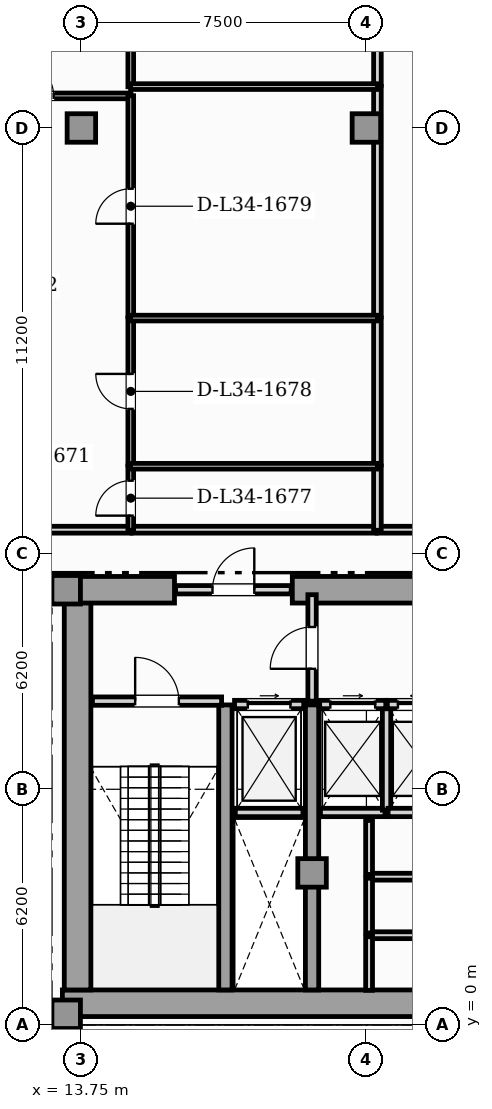
"""IFC4 building model, lengths in metres.
Left out: names, types, materials, properties, quantities, classifications, styles, units other than length and angle.
Written with IfcOpenShell. Run it as: python <this file> out.ifc"""

import sys

from ifc_helpers import new_model, si_unit, direction, frame, frame_2d, origin, origin_2d, place, context, subcontext, project, spatial, rectangle, extrude, element, fill, save


model = new_model("IFC4")
c1 = context("Model", 3, precision=1e-05, world=origin(), true_north=direction((0.0, 1.0)))
c2 = subcontext(c1, "Body", "Model", "MODEL_VIEW")
j1 = project(units=[si_unit("LENGTHUNIT", "METRE"), si_unit("PLANEANGLEUNIT", "RADIAN")], contexts=[c1])
p1 = place(None, origin())
s1 = spatial("IfcSite", under=j1, at=p1, CompositionType="ELEMENT")
p2 = place(p1, origin())
s2 = spatial("IfcBuilding", under=s1, at=p2, CompositionType="ELEMENT")
p3 = place(p2, frame((0.0, 0.0, 140.15)))
s3 = spatial("IfcBuildingStorey", under=s2, at=p3, CompositionType="ELEMENT", Elevation=140.15)
p4 = place(p3, frame((13.25, 0.57, 0.0), z_axis=(0.0, 0.0, 1.0), x_axis=(1.0, 0.0, 0.0)))
e1 = element("IfcWall", 1, at=p4, inside=s3, PredefinedType="SHEAR", context=c2, shape_type="SweptSolid", body=[
    extrude(rectangle(XDim=31.0, YDim=0.7, at=frame_2d((15.5, 0.0))), origin(), (0.0, 0.0, 1.0), 4.83),
])
p5 = place(p3, frame((13.65, 0.92, 0.0), z_axis=(0.0, 0.0, 1.0), x_axis=(0.0, 1.0, 0.0)))
e2 = element("IfcWall", 2, at=p5, inside=s3, PredefinedType="SHEAR", context=c2, shape_type="SweptSolid", body=[
    extrude(rectangle(XDim=10.53, YDim=0.7, at=frame_2d((5.265, 0.0))), origin(), (0.0, 0.0, 1.0), 4.83),
])
p6 = place(p3, frame((13.25, 11.45, 0.0), z_axis=(0.0, 0.0, 1.0), x_axis=(1.0, 0.0, 0.0)))
e3 = element("IfcWall", 3, at=p6, inside=s3, PredefinedType="SHEAR", context=c2, shape_type="SweptSolid", body=[
    extrude(rectangle(XDim=2.95, YDim=0.7, at=frame_2d((1.475, 0.0))), origin(), (0.0, 0.0, 1.0), 4.83),
])
p7 = place(p3, frame((19.3, 11.45, 0.0), z_axis=(0.0, 0.0, 1.0), x_axis=(1.0, 0.0, 0.0)))
e4 = element("IfcWall", 4, at=p7, inside=s3, PredefinedType="SHEAR", context=c2, shape_type="SweptSolid", body=[
    extrude(rectangle(XDim=7.3, YDim=0.7, at=frame_2d((3.65, 0.0))), origin(), (0.0, 0.0, 1.0), 4.83),
])
for number, where, z_axis, x_axis in (
    (5, (17.54, 0.92, 0.0), (0.0, 0.0, 1.0), (0.0, 1.0, 0.0)),
    (6, (19.82, 0.92, 0.0), (0.0, 0.0, 1.0), (0.0, 1.0, 0.0)),
):
    element("IfcWall", number, at=place(p3, frame(where, z_axis=z_axis, x_axis=x_axis)), inside=s3, PredefinedType="SHEAR", context=c2, shape_type="SweptSolid", body=[
        extrude(rectangle(XDim=7.5, YDim=0.35, at=frame_2d((3.75, 0.0))), origin(), (0.0, 0.0, 1.0), 4.83),
    ])
for number, where, z_axis, x_axis in (
    (7, (13.35, 0.28, 0.0), (0.0, 0.0, 1.0), (1.0, 0.0, 0.0)),
    (8, (13.35, 11.45, 0.0), (0.0, 0.0, 1.0), (1.0, 0.0, 0.0)),
    (9, (19.82, 4.0, 0.0), (0.0, 0.0, 1.0), (1.0, 0.0, 0.0)),
    (10, (13.75, 23.6, 0.0), (0.0, 0.0, 1.0), (1.0, 0.0, 0.0)),
    (11, (21.25, 23.6, 0.0), (0.0, 0.0, 1.0), (1.0, 0.0, 0.0)),
):
    element("IfcColumn", number, at=place(p3, frame(where, z_axis=z_axis, x_axis=x_axis)), inside=s3, PredefinedType="COLUMN", context=c2, shape_type="SweptSolid", body=[
        extrude(rectangle(XDim=0.75, YDim=0.75, at=origin_2d()), origin(), (0.0, 0.0, 1.0), 5.05),
    ])
p8 = place(p3, frame((5.84, 0.18, 0.0), z_axis=(0.0, 0.0, 1.0), x_axis=(1.0, 0.0, 0.0)))
e12 = element("IfcWall", 12, at=p8, inside=s3, PredefinedType="SOLIDWALL", context=c2, shape_type="SweptSolid", body=[
    extrude(rectangle(XDim=7.41, YDim=0.3, at=frame_2d((3.705, 0.0))), origin(), (0.0, 0.0, 1.0), 4.83),
])
p9 = place(p8, frame((2.505, 0.0, 0.85)))
e13 = element("IfcOpeningElement", 13, at=p9, cuts=e12, PredefinedType="OPENING", context=c2, shape_type="SweptSolid", body=[
    extrude(rectangle(XDim=2.4, YDim=2.0, at=frame_2d((1.2, 1.0))), frame((0.0, 0.16, 0.0), z_axis=(0.0, -1.0, 0.0), x_axis=(1.0, 0.0, 0.0)), (0.0, 0.0, 1.0), 0.32),
])
p10 = place(p3, frame((17.8, 5.59, 0.0), z_axis=(0.0, 0.0, 1.0), x_axis=(1.0, 0.0, 0.0)))
e14 = element("IfcWall", 14, at=p10, inside=s3, PredefinedType="SOLIDWALL", context=c2, shape_type="SweptSolid", body=[
    extrude(rectangle(XDim=1.78, YDim=0.22, at=frame_2d((0.89, 0.0))), origin(), (0.0, 0.0, 1.0), 4.83),
])
p11 = place(p3, frame((17.78, 8.43, 0.0), z_axis=(0.0, 0.0, 1.0), x_axis=(1.0, 0.0, 0.0)))
e15 = element("IfcWall", 15, at=p11, inside=s3, PredefinedType="SOLIDWALL", context=c2, shape_type="SweptSolid", body=[
    extrude(rectangle(XDim=1.82, YDim=0.22, at=frame_2d((0.91, 0.0))), origin(), (0.0, 0.0, 1.0), 4.83),
])
p12 = place(p11, frame((0.35, 0.0, 0.0)))
e16 = element("IfcOpeningElement", 16, at=p12, cuts=e15, PredefinedType="OPENING", context=c2, shape_type="SweptSolid", body=[
    extrude(rectangle(XDim=1.12, YDim=2.25, at=frame_2d((0.56, 1.125))), frame((0.0, 0.12, 0.0), z_axis=(0.0, -1.0, 0.0), x_axis=(1.0, 0.0, 0.0)), (0.0, 0.0, 1.0), 0.24),
])
p13 = place(p3, frame((20.04, 5.59, 0.0), z_axis=(0.0, 0.0, 1.0), x_axis=(1.0, 0.0, 0.0)))
e17 = element("IfcWall", 17, at=p13, inside=s3, PredefinedType="SOLIDWALL", context=c2, shape_type="SweptSolid", body=[
    extrude(rectangle(XDim=1.7, YDim=0.22, at=frame_2d((0.85, 0.0))), origin(), (0.0, 0.0, 1.0), 4.83),
])
p14 = place(p3, frame((21.78, 5.65, 0.0), z_axis=(0.0, 0.0, 1.0), x_axis=(0.0, 1.0, 0.0)))
e18 = element("IfcWall", 18, at=p14, inside=s3, PredefinedType="SOLIDWALL", context=c2, shape_type="SweptSolid", body=[
    extrude(rectangle(XDim=2.7, YDim=0.22, at=frame_2d((1.35, 0.0))), origin(), (0.0, 0.0, 1.0), 4.83),
])
p15 = place(p3, frame((20.02, 8.43, 0.0), z_axis=(0.0, 0.0, 1.0), x_axis=(1.0, 0.0, 0.0)))
e19 = element("IfcWall", 19, at=p15, inside=s3, PredefinedType="SOLIDWALL", context=c2, shape_type="SweptSolid", body=[
    extrude(rectangle(XDim=1.74, YDim=0.22, at=frame_2d((0.87, 0.0))), origin(), (0.0, 0.0, 1.0), 4.83),
])
p16 = place(p15, frame((0.28, 0.0, 0.0)))
e20 = element("IfcOpeningElement", 20, at=p16, cuts=e19, PredefinedType="OPENING", context=c2, shape_type="SweptSolid", body=[
    extrude(rectangle(XDim=1.18, YDim=2.2, at=frame_2d((0.59, 1.1))), frame((0.0, 0.12, 0.0), z_axis=(0.0, -1.0, 0.0), x_axis=(1.0, 0.0, 0.0)), (0.0, 0.0, 1.0), 0.24),
])
p17 = place(p3, frame((21.82, 5.59, 0.0), z_axis=(0.0, 0.0, 1.0), x_axis=(1.0, 0.0, 0.0)))
e21 = element("IfcWall", 21, at=p17, inside=s3, PredefinedType="SOLIDWALL", context=c2, shape_type="SweptSolid", body=[
    extrude(rectangle(XDim=1.7, YDim=0.22, at=frame_2d((0.85, 0.0))), origin(), (0.0, 0.0, 1.0), 4.83),
])
p18 = place(p3, frame((21.8, 8.43, 0.0), z_axis=(0.0, 0.0, 1.0), x_axis=(1.0, 0.0, 0.0)))
e22 = element("IfcWall", 22, at=p18, inside=s3, PredefinedType="SOLIDWALL", context=c2, shape_type="SweptSolid", body=[
    extrude(rectangle(XDim=1.74, YDim=0.22, at=frame_2d((0.87, 0.0))), origin(), (0.0, 0.0, 1.0), 4.83),
])
p19 = place(p18, frame((0.28, 0.0, 0.0)))
e23 = element("IfcOpeningElement", 23, at=p19, cuts=e22, PredefinedType="OPENING", context=c2, shape_type="SweptSolid", body=[
    extrude(rectangle(XDim=1.18, YDim=2.2, at=frame_2d((0.59, 1.1))), frame((0.0, 0.12, 0.0), z_axis=(0.0, -1.0, 0.0), x_axis=(1.0, 0.0, 0.0)), (0.0, 0.0, 1.0), 0.24),
])
p20 = place(p3, frame((14.04, 8.52, 0.0), z_axis=(0.0, 0.0, 1.0), x_axis=(1.0, 0.0, 0.0)))
e24 = element("IfcWall", 24, at=p20, inside=s3, PredefinedType="SOLIDWALL", context=c2, shape_type="SweptSolid", body=[
    extrude(rectangle(XDim=3.4, YDim=0.22, at=frame_2d((1.7, 0.0))), origin(), (0.0, 0.0, 1.0), 4.83),
])
p21 = place(p20, frame((1.125, 0.0, 0.0)))
e25 = element("IfcOpeningElement", 25, at=p21, cuts=e24, PredefinedType="OPENING", context=c2, shape_type="SweptSolid", body=[
    extrude(rectangle(XDim=1.15, YDim=2.2, at=frame_2d((0.575, 1.1))), frame((0.0, 0.12, 0.0), z_axis=(0.0, -1.0, 0.0), x_axis=(1.0, 0.0, 0.0)), (0.0, 0.0, 1.0), 0.24),
])
p22 = place(p3, frame((19.82, 8.52, 0.0), z_axis=(0.0, 0.0, 1.0), x_axis=(0.0, 1.0, 0.0)))
e26 = element("IfcWall", 26, at=p22, inside=s3, PredefinedType="SOLIDWALL", context=c2, shape_type="SweptSolid", body=[
    extrude(rectangle(XDim=2.8, YDim=0.22, at=frame_2d((1.4, 0.0))), origin(), (0.0, 0.0, 1.0), 4.286),
])
p23 = place(p22, frame((0.85, 0.0, 0.0)))
e27 = element("IfcOpeningElement", 27, at=p23, cuts=e26, PredefinedType="OPENING", context=c2, shape_type="SweptSolid", body=[
    extrude(rectangle(XDim=1.1, YDim=2.2, at=frame_2d((0.55, 1.1))), frame((0.0, 0.12, 0.0), z_axis=(0.0, -1.0, 0.0), x_axis=(1.0, 0.0, 0.0)), (0.0, 0.0, 1.0), 0.24),
])
p24 = place(p3, frame((16.23, 11.45, 0.0), z_axis=(0.0, 0.0, 1.0), x_axis=(1.0, 0.0, 0.0)))
e28 = element("IfcWall", 28, at=p24, inside=s3, PredefinedType="SOLIDWALL", context=c2, shape_type="SweptSolid", body=[
    extrude(rectangle(XDim=3.04, YDim=0.22, at=frame_2d((1.52, 0.0))), origin(), (0.0, 0.0, 1.0), 4.83),
])
p25 = place(p24, frame((0.97, 0.0, 0.0)))
e29 = element("IfcOpeningElement", 29, at=p25, cuts=e28, PredefinedType="OPENING", context=c2, shape_type="SweptSolid", body=[
    extrude(rectangle(XDim=1.1, YDim=2.2, at=frame_2d((0.55, 1.1))), frame((0.0, 0.12, 0.0), z_axis=(0.0, -1.0, 0.0), x_axis=(1.0, 0.0, 0.0)), (0.0, 0.0, 1.0), 0.24),
])
p26 = place(p3, frame((21.36, 2.36, 0.0), z_axis=(0.0, 0.0, 1.0), x_axis=(1.0, 0.0, 0.0)))
e30 = element("IfcWall", 30, at=p26, inside=s3, PredefinedType="PARTITIONING", context=c2, shape_type="SweptSolid", body=[
    extrude(rectangle(XDim=3.94, YDim=0.18, at=frame_2d((1.97, 0.0))), origin(), (0.0, 0.0, 1.0), 4.83),
])
p27 = place(p3, frame((21.32, 0.91, 0.0), z_axis=(0.0, 0.0, 1.0), x_axis=(0.0, 1.0, 0.0)))
e31 = element("IfcWall", 31, at=p27, inside=s3, PredefinedType="PARTITIONING", context=c2, shape_type="SweptSolid", body=[
    extrude(rectangle(XDim=1.41, YDim=0.18, at=frame_2d((0.705, 0.0))), origin(), (0.0, 0.0, 1.0), 4.83),
])
p28 = place(p3, frame((21.36, 3.9, 0.0), z_axis=(0.0, 0.0, 1.0), x_axis=(1.0, 0.0, 0.0)))
e32 = element("IfcWall", 32, at=p28, inside=s3, PredefinedType="PARTITIONING", context=c2, shape_type="SweptSolid", body=[
    extrude(rectangle(XDim=3.94, YDim=0.18, at=frame_2d((1.97, 0.0))), origin(), (0.0, 0.0, 1.0), 4.83),
])
p29 = place(p3, frame((21.32, 2.42, 0.0), z_axis=(0.0, 0.0, 1.0), x_axis=(0.0, 1.0, 0.0)))
e33 = element("IfcWall", 33, at=p29, inside=s3, PredefinedType="PARTITIONING", context=c2, shape_type="SweptSolid", body=[
    extrude(rectangle(XDim=1.44, YDim=0.18, at=frame_2d((0.72, 0.0))), origin(), (0.0, 0.0, 1.0), 4.83),
])
p30 = place(p3, frame((21.32, 3.96, 0.0), z_axis=(0.0, 0.0, 1.0), x_axis=(0.0, 1.0, 0.0)))
e34 = element("IfcWall", 34, at=p30, inside=s3, PredefinedType="PARTITIONING", context=c2, shape_type="SweptSolid", body=[
    extrude(rectangle(XDim=1.42, YDim=0.18, at=frame_2d((0.71, 0.0))), origin(), (0.0, 0.0, 1.0), 4.83),
])
p31 = place(p3, frame((6.105, 11.585, 0.0), z_axis=(0.0, 0.0, 1.0), x_axis=(1.0, 0.0, 0.0)))
e35 = element("IfcWall", 35, at=p31, inside=s3, PredefinedType="PARTITIONING", context=c2, shape_type="SweptSolid", body=[
    extrude(rectangle(XDim=7.04, YDim=0.18, at=frame_2d((3.52, 0.0))), origin(), (0.0, 0.0, 1.0), 4.83),
])
p32 = place(p31, frame((3.02, 0.0, 0.0)))
e36 = element("IfcOpeningElement", 36, at=p32, cuts=e35, PredefinedType="OPENING", context=c2, shape_type="SweptSolid", body=[
    extrude(rectangle(XDim=1.0, YDim=2.15, at=frame_2d((0.5, 1.075))), frame((0.0, 0.1, 0.0), z_axis=(0.0, -1.0, 0.0), x_axis=(1.0, 0.0, 0.0)), (0.0, 0.0, 1.0), 0.2),
])
p33 = place(p3, frame((21.535, 13.03, 0.0), z_axis=(0.0, 0.0, 1.0), x_axis=(1.0, 0.0, 0.0)))
e37 = element("IfcWall", 37, at=p33, inside=s3, PredefinedType="PARTITIONING", context=c2, shape_type="SweptSolid", body=[
    extrude(rectangle(XDim=10.23, YDim=0.18, at=frame_2d((5.115, 0.0))), origin(), (0.0, 0.0, 1.0), 4.83),
])
p34 = place(p33, frame((3.081, 0.0, 0.0)))
e38 = element("IfcOpeningElement", 38, at=p34, cuts=e37, PredefinedType="OPENING", context=c2, shape_type="SweptSolid", body=[
    extrude(rectangle(XDim=1.0, YDim=2.15, at=frame_2d((0.5, 1.075))), frame((0.0, 0.1, 0.0), z_axis=(0.0, -1.0, 0.0), x_axis=(1.0, 0.0, 0.0)), (0.0, 0.0, 1.0), 0.2),
])
p35 = place(p3, frame((10.065, 13.03, 0.0), z_axis=(0.0, 0.0, 1.0), x_axis=(1.0, 0.0, 0.0)))
e39 = element("IfcWall", 39, at=p35, inside=s3, PredefinedType="PARTITIONING", context=c2, shape_type="SweptSolid", body=[
    extrude(rectangle(XDim=4.99, YDim=0.18, at=frame_2d((2.495, 0.0))), origin(), (0.0, 0.0, 1.0), 4.83),
])
p36 = place(p35, frame((1.247, 0.0, 0.0)))
e40 = element("IfcOpeningElement", 40, at=p36, cuts=e39, PredefinedType="OPENING", context=c2, shape_type="SweptSolid", body=[
    extrude(rectangle(XDim=1.0, YDim=2.15, at=frame_2d((0.5, 1.075))), frame((0.0, 0.1, 0.0), z_axis=(0.0, -1.0, 0.0), x_axis=(1.0, 0.0, 0.0)), (0.0, 0.0, 1.0), 0.2),
])
p37 = place(p3, frame((15.085, 13.03, 0.0), z_axis=(0.0, 0.0, 1.0), x_axis=(1.0, 0.0, 0.0)))
e41 = element("IfcWall", 41, at=p37, inside=s3, PredefinedType="PARTITIONING", context=c2, shape_type="SweptSolid", body=[
    extrude(rectangle(XDim=6.42, YDim=0.18, at=frame_2d((3.21, 0.0))), origin(), (0.0, 0.0, 1.0), 4.83),
])
p38 = place(p3, frame((21.54, 13.015, 0.0), z_axis=(0.0, 0.0, 1.0), x_axis=(0.0, 1.0, 0.0)))
e42 = element("IfcWall", 42, at=p38, inside=s3, PredefinedType="PARTITIONING", context=c2, shape_type="SweptSolid", body=[
    extrude(rectangle(XDim=1.69, YDim=0.2, at=frame_2d((0.845, 0.0))), origin(), (0.0, 0.0, 1.0), 4.83),
])
p39 = place(p3, frame((21.54, 14.735, 0.0), z_axis=(0.0, 0.0, 1.0), x_axis=(0.0, 1.0, 0.0)))
e43 = element("IfcWall", 43, at=p39, inside=s3, PredefinedType="PARTITIONING", context=c2, shape_type="SweptSolid", body=[
    extrude(rectangle(XDim=3.868, YDim=0.2, at=frame_2d((1.934, 0.0))), origin(), (0.0, 0.0, 1.0), 4.83),
])
p40 = place(p3, frame((21.54, 18.633, 0.0), z_axis=(0.0, 0.0, 1.0), x_axis=(0.0, 1.0, 0.0)))
e44 = element("IfcWall", 44, at=p40, inside=s3, PredefinedType="PARTITIONING", context=c2, shape_type="SweptSolid", body=[
    extrude(rectangle(XDim=6.061, YDim=0.2, at=frame_2d((3.03, 0.0))), origin(), (0.0, 0.0, 1.0), 4.83),
])
p41 = place(p3, frame((21.54, 24.724, 0.0), z_axis=(0.0, 0.0, 1.0), x_axis=(0.0, 1.0, 0.0)))
e45 = element("IfcWall", 45, at=p41, inside=s3, PredefinedType="PARTITIONING", context=c2, shape_type="SweptSolid", body=[
    extrude(rectangle(XDim=8.741, YDim=0.2, at=frame_2d((4.371, 0.0))), origin(), (0.0, 0.0, 1.0), 4.83),
])
p42 = place(p3, frame((10.065, 24.444, 0.0), z_axis=(0.0, 0.0, 1.0), x_axis=(1.0, 0.0, 0.0)))
e46 = element("IfcWall", 46, at=p42, inside=s3, PredefinedType="PARTITIONING", context=c2, shape_type="SweptSolid", body=[
    extrude(rectangle(XDim=4.99, YDim=0.15, at=frame_2d((2.495, 0.0))), origin(), (0.0, 0.0, 1.0), 4.83),
])
p43 = place(p42, frame((2.035, 0.0, 0.0)))
e47 = element("IfcOpeningElement", 47, at=p43, cuts=e46, PredefinedType="OPENING", context=c2, shape_type="SweptSolid", body=[
    extrude(rectangle(XDim=0.92, YDim=2.1, at=frame_2d((0.46, 1.05))), frame((0.0, 0.085, 0.0), z_axis=(0.0, -1.0, 0.0), x_axis=(1.0, 0.0, 0.0)), (0.0, 0.0, 1.0), 0.17),
])
p44 = place(p3, frame((15.05, 13.015, 0.0), z_axis=(0.0, 0.0, 1.0), x_axis=(0.0, 1.0, 0.0)))
e48 = element("IfcWall", 48, at=p44, inside=s3, PredefinedType="PARTITIONING", context=c2, shape_type="SweptSolid", body=[
    extrude(rectangle(XDim=1.69, YDim=0.15, at=frame_2d((0.845, 0.0))), origin(), (0.0, 0.0, 1.0), 4.83),
])
p45 = place(p44, frame((0.385, 0.0, 0.0)))
e49 = element("IfcOpeningElement", 49, at=p45, cuts=e48, PredefinedType="OPENING", context=c2, shape_type="SweptSolid", body=[
    extrude(rectangle(XDim=0.92, YDim=2.1, at=frame_2d((0.46, 1.05))), frame((0.0, 0.085, 0.0), z_axis=(0.0, -1.0, 0.0), x_axis=(1.0, 0.0, 0.0)), (0.0, 0.0, 1.0), 0.17),
])
p46 = place(p3, frame((15.05, 14.735, 0.0), z_axis=(0.0, 0.0, 1.0), x_axis=(0.0, 1.0, 0.0)))
e50 = element("IfcWall", 50, at=p46, inside=s3, PredefinedType="PARTITIONING", context=c2, shape_type="SweptSolid", body=[
    extrude(rectangle(XDim=3.868, YDim=0.15, at=frame_2d((1.934, 0.0))), origin(), (0.0, 0.0, 1.0), 4.83),
])
p47 = place(p46, frame((1.474, 0.0, 0.0)))
e51 = element("IfcOpeningElement", 51, at=p47, cuts=e50, PredefinedType="OPENING", context=c2, shape_type="SweptSolid", body=[
    extrude(rectangle(XDim=0.92, YDim=2.1, at=frame_2d((0.46, 1.05))), frame((0.0, 0.085, 0.0), z_axis=(0.0, -1.0, 0.0), x_axis=(1.0, 0.0, 0.0)), (0.0, 0.0, 1.0), 0.17),
])
p48 = place(p3, frame((15.05, 18.633, 0.0), z_axis=(0.0, 0.0, 1.0), x_axis=(0.0, 1.0, 0.0)))
e52 = element("IfcWall", 52, at=p48, inside=s3, PredefinedType="PARTITIONING", context=c2, shape_type="SweptSolid", body=[
    extrude(rectangle(XDim=5.816, YDim=0.15, at=frame_2d((2.908, 0.0))), origin(), (0.0, 0.0, 1.0), 4.83),
])
p49 = place(p48, frame((2.448, 0.0, 0.0)))
e53 = element("IfcOpeningElement", 53, at=p49, cuts=e52, PredefinedType="OPENING", context=c2, shape_type="SweptSolid", body=[
    extrude(rectangle(XDim=0.92, YDim=2.1, at=frame_2d((0.46, 1.05))), frame((0.0, 0.085, 0.0), z_axis=(0.0, -1.0, 0.0), x_axis=(1.0, 0.0, 0.0)), (0.0, 0.0, 1.0), 0.17),
])
p50 = place(p3, frame((15.05, 24.684, 0.0), z_axis=(0.0, 0.0, 1.0), x_axis=(0.0, 1.0, 0.0)))
e54 = element("IfcWall", 54, at=p50, inside=s3, PredefinedType="PARTITIONING", context=c2, shape_type="SweptSolid", body=[
    extrude(rectangle(XDim=8.821, YDim=0.15, at=frame_2d((4.411, 0.0))), origin(), (0.0, 0.0, 1.0), 4.83),
])
p51 = place(p50, frame((5.274, 0.0, 0.0)))
e55 = element("IfcOpeningElement", 55, at=p51, cuts=e54, PredefinedType="OPENING", context=c2, shape_type="SweptSolid", body=[
    extrude(rectangle(XDim=0.92, YDim=2.1, at=frame_2d((0.46, 1.05))), frame((0.0, 0.085, 0.0), z_axis=(0.0, -1.0, 0.0), x_axis=(1.0, 0.0, 0.0)), (0.0, 0.0, 1.0), 0.17),
])
for number, where, z_axis, x_axis in (
    (56, (15.045, 14.7, 0.0), (0.0, 0.0, 1.0), (1.0, 0.0, 0.0)),
    (57, (15.045, 18.598, 0.0), (0.0, 0.0, 1.0), (1.0, 0.0, 0.0)),
    (58, (15.045, 24.689, 0.0), (0.0, 0.0, 1.0), (1.0, 0.0, 0.0)),
):
    element("IfcWall", number, at=place(p3, frame(where, z_axis=z_axis, x_axis=x_axis)), inside=s3, PredefinedType="PARTITIONING", context=c2, shape_type="SweptSolid", body=[
        extrude(rectangle(XDim=6.5, YDim=0.15, at=frame_2d((3.25, 0.0))), origin(), (0.0, 0.0, 1.0), 4.83),
    ])
p52 = place(p12, origin())
e59 = element("IfcDoor", 59, at=p52, inside=s3, OperationType="SLIDING_TO_RIGHT", PredefinedType="DOOR", context=c2, shape_type="SweptSolid", body=[
    extrude(rectangle(XDim=1.12, YDim=2.25, at=frame_2d((0.56, 1.125))), frame((0.0, 0.025, 0.0), z_axis=(0.0, -1.0, 0.0), x_axis=(1.0, 0.0, 0.0)), (0.0, 0.0, 1.0), 0.05),
])
fill(e16, e59)
p53 = place(p16, origin())
e60 = element("IfcDoor", 60, at=p53, inside=s3, OperationType="SLIDING_TO_RIGHT", PredefinedType="DOOR", context=c2, shape_type="SweptSolid", body=[
    extrude(rectangle(XDim=1.18, YDim=2.2, at=frame_2d((0.59, 1.1))), frame((0.0, 0.025, 0.0), z_axis=(0.0, -1.0, 0.0), x_axis=(1.0, 0.0, 0.0)), (0.0, 0.0, 1.0), 0.05),
])
fill(e20, e60)
p54 = place(p19, origin())
e61 = element("IfcDoor", 61, at=p54, inside=s3, OperationType="SLIDING_TO_LEFT", PredefinedType="DOOR", context=c2, shape_type="SweptSolid", body=[
    extrude(rectangle(XDim=1.18, YDim=2.2, at=frame_2d((0.59, 1.1))), frame((0.0, 0.025, 0.0), z_axis=(0.0, -1.0, 0.0), x_axis=(1.0, 0.0, 0.0)), (0.0, 0.0, 1.0), 0.05),
])
fill(e23, e61)
p55 = place(p21, origin())
e62 = element("IfcDoor", 62, at=p55, inside=s3, OperationType="SINGLE_SWING_LEFT", PredefinedType="DOOR", context=c2, shape_type="SweptSolid", body=[
    extrude(rectangle(XDim=1.15, YDim=2.2, at=frame_2d((0.575, 1.1))), frame((0.0, 0.025, 0.0), z_axis=(0.0, -1.0, 0.0), x_axis=(1.0, 0.0, 0.0)), (0.0, 0.0, 1.0), 0.05),
])
fill(e25, e62)
p56 = place(p23, origin())
e63 = element("IfcDoor", 63, at=p56, inside=s3, OperationType="SINGLE_SWING_LEFT", PredefinedType="DOOR", context=c2, shape_type="SweptSolid", body=[
    extrude(rectangle(XDim=1.1, YDim=2.2, at=frame_2d((0.55, 1.1))), frame((0.0, 0.025, 0.0), z_axis=(0.0, -1.0, 0.0), x_axis=(1.0, 0.0, 0.0)), (0.0, 0.0, 1.0), 0.05),
])
fill(e27, e63)
p57 = place(p25, origin())
e64 = element("IfcDoor", 64, at=p57, inside=s3, OperationType="SINGLE_SWING_RIGHT", PredefinedType="DOOR", context=c2, shape_type="SweptSolid", body=[
    extrude(rectangle(XDim=1.1, YDim=2.2, at=frame_2d((0.55, 1.1))), frame((0.0, 0.025, 0.0), z_axis=(0.0, -1.0, 0.0), x_axis=(1.0, 0.0, 0.0)), (0.0, 0.0, 1.0), 0.05),
])
fill(e29, e64)
p58 = place(p43, origin())
e65 = element("IfcDoor", 65, at=p58, inside=s3, OperationType="SINGLE_SWING_LEFT", PredefinedType="DOOR", context=c2, shape_type="SweptSolid", body=[
    extrude(rectangle(XDim=0.92, YDim=2.1, at=frame_2d((0.46, 1.05))), frame((0.0, 0.025, 0.0), z_axis=(0.0, -1.0, 0.0), x_axis=(1.0, 0.0, 0.0)), (0.0, 0.0, 1.0), 0.05),
])
fill(e47, e65)
p59 = place(p45, origin())
e66 = element("IfcDoor", 66, at=p59, inside=s3, OperationType="SINGLE_SWING_LEFT", PredefinedType="DOOR", context=c2, shape_type="SweptSolid", body=[
    extrude(rectangle(XDim=0.92, YDim=2.1, at=frame_2d((0.46, 1.05))), frame((0.0, 0.025, 0.0), z_axis=(0.0, -1.0, 0.0), x_axis=(1.0, 0.0, 0.0)), (0.0, 0.0, 1.0), 0.05),
])
fill(e49, e66)
p60 = place(p47, origin())
e67 = element("IfcDoor", 67, at=p60, inside=s3, OperationType="SINGLE_SWING_RIGHT", PredefinedType="DOOR", context=c2, shape_type="SweptSolid", body=[
    extrude(rectangle(XDim=0.92, YDim=2.1, at=frame_2d((0.46, 1.05))), frame((0.0, 0.025, 0.0), z_axis=(0.0, -1.0, 0.0), x_axis=(1.0, 0.0, 0.0)), (0.0, 0.0, 1.0), 0.05),
])
fill(e51, e67)
p61 = place(p49, origin())
e68 = element("IfcDoor", 68, at=p61, inside=s3, OperationType="SINGLE_SWING_LEFT", PredefinedType="DOOR", context=c2, shape_type="SweptSolid", body=[
    extrude(rectangle(XDim=0.92, YDim=2.1, at=frame_2d((0.46, 1.05))), frame((0.0, 0.025, 0.0), z_axis=(0.0, -1.0, 0.0), x_axis=(1.0, 0.0, 0.0)), (0.0, 0.0, 1.0), 0.05),
])
fill(e53, e68)
save(model, sys.argv[1])
